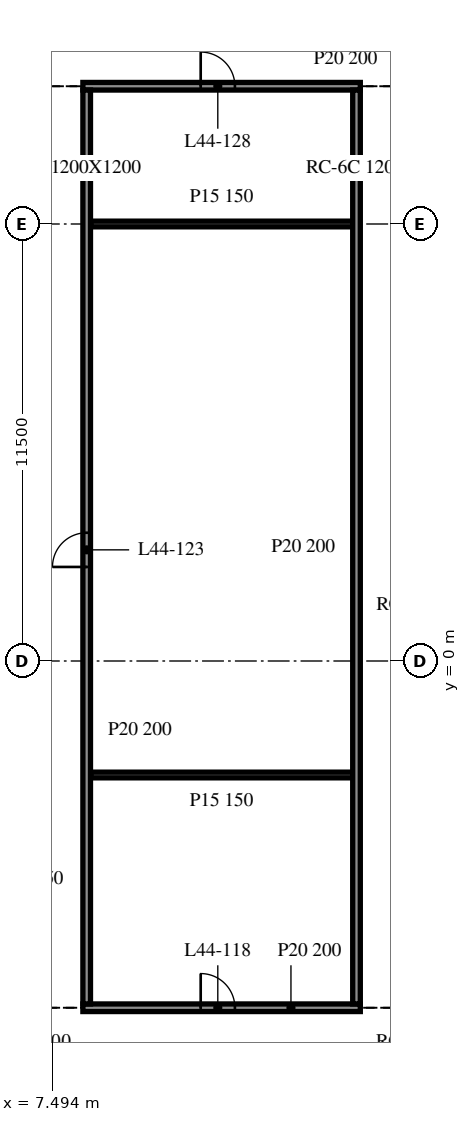
"""IFC4 building model, lengths in metres.
Left out: names, types, materials, properties, quantities, classifications, styles, units other than length and angle.
Written with IfcOpenShell. Run it as: python <this file> out.ifc"""

import sys

from ifc_helpers import new_model, si_unit, direction, frame, frame_2d, origin, place, context, subcontext, project, spatial, rectangle, extrude, element, fill, save


model = new_model("IFC4")
c1 = context("Model", 3, precision=1e-05, world=origin(), true_north=direction((0.0, 1.0)))
c2 = subcontext(c1, "Body", "Model", "MODEL_VIEW")
j1 = project(units=[si_unit("LENGTHUNIT", "METRE"), si_unit("PLANEANGLEUNIT", "RADIAN")], contexts=[c1])
p1 = place(None, origin())
s1 = spatial("IfcSite", under=j1, at=p1, CompositionType="ELEMENT")
p2 = place(p1, origin())
s2 = spatial("IfcBuilding", under=s1, at=p2, CompositionType="ELEMENT")
p3 = place(p2, frame((0.0, 0.0, 185.8)))
s3 = spatial("IfcBuildingStorey", under=s2, at=p3, CompositionType="ELEMENT", Elevation=185.8)
p4 = place(p3, frame((8.3, -9.125, 0.0), z_axis=(0.0, 0.0, 1.0), x_axis=(1.0, 0.0, 0.0)))
e1 = element("IfcWall", 1, at=p4, inside=s3, PredefinedType="PARTITIONING", context=c2, shape_type="SweptSolid", body=[
    extrude(rectangle(XDim=7.3, YDim=0.2, at=frame_2d((3.65, 0.0))), origin(), (0.0, 0.0, 1.0), 3.4),
])
p5 = place(p4, frame((3.1, 0.0, 0.0)))
e2 = element("IfcOpeningElement", 2, at=p5, cuts=e1, PredefinedType="OPENING", context=c2, shape_type="SweptSolid", body=[
    extrude(rectangle(XDim=0.9, YDim=2.1, at=frame_2d((0.45, 1.05))), frame((0.0, 0.11, 0.0), z_axis=(0.0, -1.0, 0.0), x_axis=(1.0, 0.0, 0.0)), (0.0, 0.0, 1.0), 0.22),
])
for number, where, z_axis, x_axis in (
    (3, (8.5, -3.0, 0.0), (0.0, 0.0, 1.0), (1.0, 0.0, 0.0)),
    (4, (8.5, 11.5, 0.0), (0.0, 0.0, 1.0), (1.0, 0.0, 0.0)),
):
    element("IfcWall", number, at=place(p3, frame(where, z_axis=z_axis, x_axis=x_axis)), inside=s3, PredefinedType="PARTITIONING", context=c2, shape_type="SweptSolid", body=[
        extrude(rectangle(XDim=6.9, YDim=0.15, at=frame_2d((3.45, 0.0))), origin(), (0.0, 0.0, 1.0), 3.4),
    ])
p6 = place(p3, frame((8.3, 15.125, 0.0), z_axis=(0.0, 0.0, 1.0), x_axis=(1.0, 0.0, 0.0)))
e5 = element("IfcWall", 5, at=p6, inside=s3, PredefinedType="PARTITIONING", context=c2, shape_type="SweptSolid", body=[
    extrude(rectangle(XDim=7.3, YDim=0.2, at=frame_2d((3.65, 0.0))), origin(), (0.0, 0.0, 1.0), 3.4),
])
p7 = place(p6, frame((3.1, 0.0, 0.0)))
e6 = element("IfcOpeningElement", 6, at=p7, cuts=e5, PredefinedType="OPENING", context=c2, shape_type="SweptSolid", body=[
    extrude(rectangle(XDim=0.9, YDim=2.1, at=frame_2d((0.45, 1.05))), frame((0.0, 0.11, 0.0), z_axis=(0.0, -1.0, 0.0), x_axis=(1.0, 0.0, 0.0)), (0.0, 0.0, 1.0), 0.22),
])
p8 = place(p3, frame((8.4, -9.025, 0.0), z_axis=(0.0, 0.0, 1.0), x_axis=(0.0, 1.0, 0.0)))
e7 = element("IfcWall", 7, at=p8, inside=s3, PredefinedType="PARTITIONING", context=c2, shape_type="SweptSolid", body=[
    extrude(rectangle(XDim=24.05, YDim=0.2, at=frame_2d((12.025, 0.0))), origin(), (0.0, 0.0, 1.0), 3.4),
])
p9 = place(p8, frame((11.5, 0.0, 0.0)))
e8 = element("IfcOpeningElement", 8, at=p9, cuts=e7, PredefinedType="OPENING", context=c2, shape_type="SweptSolid", body=[
    extrude(rectangle(XDim=0.9, YDim=2.1, at=frame_2d((0.45, 1.05))), frame((0.0, 0.11, 0.0), z_axis=(0.0, -1.0, 0.0), x_axis=(1.0, 0.0, 0.0)), (0.0, 0.0, 1.0), 0.22),
])
p10 = place(p3, frame((15.5, -9.025, 0.0), z_axis=(0.0, 0.0, 1.0), x_axis=(0.0, 1.0, 0.0)))
e9 = element("IfcWall", 9, at=p10, inside=s3, PredefinedType="PARTITIONING", context=c2, shape_type="SweptSolid", body=[
    extrude(rectangle(XDim=24.05, YDim=0.2, at=frame_2d((12.025, 0.0))), origin(), (0.0, 0.0, 1.0), 3.4),
])
p11 = place(p5, origin())
e10 = element("IfcDoor", 10, at=p11, inside=s3, OperationType="SINGLE_SWING_LEFT", PredefinedType="DOOR", context=c2, shape_type="SweptSolid", body=[
    extrude(rectangle(XDim=0.9, YDim=2.1, at=frame_2d((0.45, 1.05))), frame((0.0, 0.025, 0.0), z_axis=(0.0, -1.0, 0.0), x_axis=(1.0, 0.0, 0.0)), (0.0, 0.0, 1.0), 0.05),
])
fill(e2, e10)
p12 = place(p9, origin())
e11 = element("IfcDoor", 11, at=p12, inside=s3, OperationType="SINGLE_SWING_RIGHT", PredefinedType="DOOR", context=c2, shape_type="SweptSolid", body=[
    extrude(rectangle(XDim=0.9, YDim=2.1, at=frame_2d((0.45, 1.05))), frame((0.0, 0.025, 0.0), z_axis=(0.0, -1.0, 0.0), x_axis=(1.0, 0.0, 0.0)), (0.0, 0.0, 1.0), 0.05),
])
fill(e8, e11)
p13 = place(p7, origin())
e12 = element("IfcDoor", 12, at=p13, inside=s3, OperationType="SINGLE_SWING_RIGHT", PredefinedType="DOOR", context=c2, shape_type="SweptSolid", body=[
    extrude(rectangle(XDim=0.9, YDim=2.1, at=frame_2d((0.45, 1.05))), frame((0.0, 0.025, 0.0), z_axis=(0.0, -1.0, 0.0), x_axis=(1.0, 0.0, 0.0)), (0.0, 0.0, 1.0), 0.05),
])
fill(e6, e12)
save(model, sys.argv[1])
